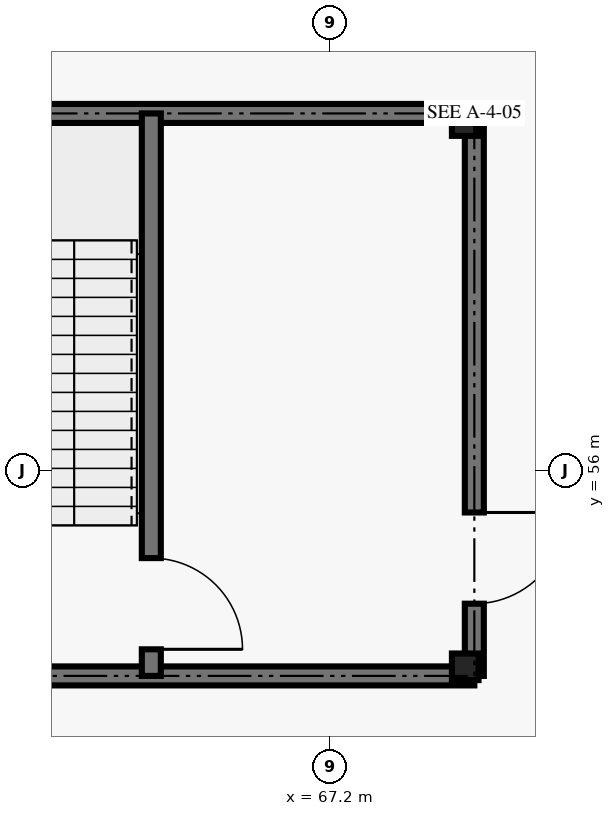
"""IFC4 building model, lengths in metres.
Left out: names, types, materials, properties, quantities, classifications, styles, units other than length and angle.
Written with IfcOpenShell. Run it as: python <this file> out.ifc"""

import sys

from ifc_helpers import new_model, si_unit, direction, frame, frame_2d, origin, origin_2d, place, context, subcontext, project, spatial, rectangle, i_section, extrude, element, fill, save


model = new_model("IFC4")
c1 = context("Model", 3, precision=1e-05, world=origin(), true_north=direction((0.0, 1.0)))
c2 = subcontext(c1, "Body", "Model", "MODEL_VIEW")
j1 = project(units=[si_unit("LENGTHUNIT", "METRE"), si_unit("PLANEANGLEUNIT", "RADIAN")], contexts=[c1])
p1 = place(None, origin())
s1 = spatial("IfcSite", under=j1, at=p1, CompositionType="ELEMENT")
p2 = place(p1, origin())
s2 = spatial("IfcBuilding", under=s1, at=p2, CompositionType="ELEMENT")
p3 = place(p2, origin())
s3 = spatial("IfcBuildingStorey", under=s2, at=p3, CompositionType="ELEMENT", Elevation=0.0)
for number, where, z_axis, x_axis in (
    (1, (68.98, 53.42, 0.0), (0.0, 0.0, 1.0), (1.0, 0.0, 0.0)),
    (2, (68.98, 60.58, 0.0), (0.0, 0.0, 1.0), (1.0, 0.0, 0.0)),
):
    element("IfcColumn", number, at=place(p3, frame(where, z_axis=z_axis, x_axis=x_axis)), inside=s3, PredefinedType="COLUMN", context=c2, shape_type="SweptSolid", body=[
        extrude(i_section(OverallWidth=0.35, OverallDepth=0.35, WebThickness=0.02, FlangeThickness=0.028, at=origin_2d()), origin(), (0.0, 0.0, 1.0), 5.4),
    ])
for number, where, z_axis, x_axis in (
    (3, (59.9, 60.7, 0.0), (0.0, 0.0, 1.0), (1.0, 0.0, 0.0)),
    (4, (69.1, 53.3, 0.0), (0.0, 0.0, 1.0), (-1.0, 0.0, 0.0)),
):
    element("IfcWall", number, at=place(p3, frame(where, z_axis=z_axis, x_axis=x_axis)), inside=s3, PredefinedType="SHEAR", context=c2, shape_type="SweptSolid", body=[
        extrude(rectangle(XDim=9.2, YDim=0.25, at=frame_2d((4.6, 0.0))), origin(), (0.0, 0.0, 1.0), 5.16),
    ])
p4 = place(p3, frame((69.1, 60.7, 0.0), z_axis=(0.0, 0.0, 1.0), x_axis=(0.0, -1.0, 0.0)))
e5 = element("IfcWall", 5, at=p4, inside=s3, PredefinedType="SHEAR", context=c2, shape_type="SweptSolid", body=[
    extrude(rectangle(XDim=7.4, YDim=0.25, at=frame_2d((3.7, 0.0))), origin(), (0.0, 0.0, 1.0), 5.16),
])
p5 = place(p4, frame((5.25, 0.0, 0.0)))
e6 = element("IfcOpeningElement", 6, at=p5, cuts=e5, PredefinedType="OPENING", context=c2, shape_type="SweptSolid", body=[
    extrude(rectangle(XDim=1.2, YDim=2.2, at=frame_2d((0.6, 1.1))), frame((0.0, 0.135, 0.0), z_axis=(0.0, -1.0, 0.0), x_axis=(1.0, 0.0, 0.0)), (0.0, 0.0, 1.0), 0.27),
])
p6 = place(p3, frame((64.85, 60.7, 0.0), z_axis=(0.0, 0.0, 1.0), x_axis=(0.0, -1.0, 0.0)))
e7 = element("IfcWall", 7, at=p6, inside=s3, PredefinedType="SHEAR", context=c2, shape_type="SweptSolid", body=[
    extrude(rectangle(XDim=7.4, YDim=0.25, at=frame_2d((3.7, 0.0))), origin(), (0.0, 0.0, 1.0), 5.16),
])
p7 = place(p6, frame((5.85, 0.0, 0.0)))
e8 = element("IfcOpeningElement", 8, at=p7, cuts=e7, PredefinedType="OPENING", context=c2, shape_type="SweptSolid", body=[
    extrude(rectangle(XDim=1.2, YDim=2.2, at=frame_2d((0.6, 1.1))), frame((0.0, 0.135, 0.0), z_axis=(0.0, -1.0, 0.0), x_axis=(1.0, 0.0, 0.0)), (0.0, 0.0, 1.0), 0.27),
])
p8 = place(p5, origin())
e9 = element("IfcDoor", 9, at=p8, inside=s3, OperationType="SINGLE_SWING_LEFT", PredefinedType="DOOR", context=c2, shape_type="SweptSolid", body=[
    extrude(rectangle(XDim=1.2, YDim=2.2, at=frame_2d((0.6, 1.1))), frame((0.0, 0.025, 0.0), z_axis=(0.0, -1.0, 0.0), x_axis=(1.0, 0.0, 0.0)), (0.0, 0.0, 1.0), 0.05),
])
fill(e6, e9)
p9 = place(p7, origin())
e10 = element("IfcDoor", 10, at=p9, inside=s3, OperationType="SINGLE_SWING_RIGHT", PredefinedType="DOOR", context=c2, shape_type="SweptSolid", body=[
    extrude(rectangle(XDim=1.2, YDim=2.2, at=frame_2d((0.6, 1.1))), frame((0.0, 0.025, 0.0), z_axis=(0.0, -1.0, 0.0), x_axis=(1.0, 0.0, 0.0)), (0.0, 0.0, 1.0), 0.05),
])
fill(e8, e10)
save(model, sys.argv[1])
